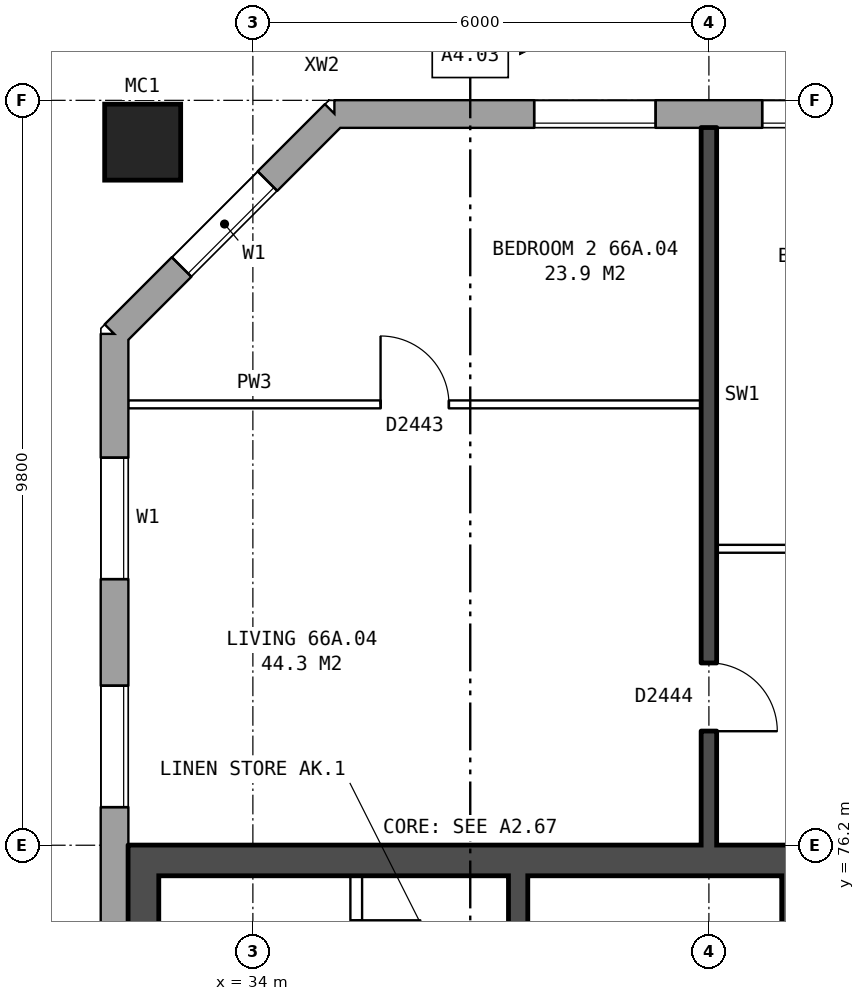
"""IFC4 building model, lengths in metres.
Left out: names, types, materials, properties, quantities, classifications, styles, units other than length and angle.
Written with IfcOpenShell. Run it as: python <this file> out.ifc"""

import sys

from ifc_helpers import new_model, si_unit, direction, frame, frame_2d, origin, origin_2d, place, context, subcontext, project, spatial, rectangle, hollow_rectangle, extrude, element, fill, save


model = new_model("IFC4")
c1 = context("Model", 3, precision=1e-05, world=origin(), true_north=direction((0.0, 1.0)))
c2 = subcontext(c1, "Body", "Model", "MODEL_VIEW")
j1 = project(units=[si_unit("LENGTHUNIT", "METRE"), si_unit("PLANEANGLEUNIT", "RADIAN")], contexts=[c1])
p1 = place(None, origin())
s1 = spatial("IfcSite", under=j1, at=p1, CompositionType="ELEMENT")
p2 = place(p1, origin())
s2 = spatial("IfcBuilding", under=s1, at=p2, CompositionType="ELEMENT")
p3 = place(p2, frame((0.0, 0.0, 233.8)))
s3 = spatial("IfcBuildingStorey", under=s2, at=p3, CompositionType="ELEMENT", Elevation=233.8)
p4 = place(p3, frame((32.55, 85.45, 0.0), z_axis=(0.0, 0.0, 1.0), x_axis=(1.0, 0.0, 0.0)))
e1 = element("IfcColumn", 1, at=p4, inside=s3, PredefinedType="COLUMN", context=c2, shape_type="SweptSolid", body=[
    extrude(hollow_rectangle(XDim=1.0, YDim=1.0, WallThickness=0.055, at=origin_2d()), origin(), (0.0, 0.0, 1.0), 3.1),
])
p5 = place(p3, frame((74.95, 85.82, 0.0), z_axis=(0.0, 0.0, 1.0), x_axis=(-1.0, 0.0, 0.0)))
e2 = element("IfcWall", 2, at=p5, inside=s3, PredefinedType="STANDARD", context=c2, shape_type="SweptSolid", body=[
    extrude(rectangle(XDim=39.875, YDim=0.36, at=frame_2d((19.938, 0.0))), origin(), (0.0, 0.0, 1.0), 2.85),
])
p6 = place(p5, frame((2.65, 0.0, 0.8)))
e3 = element("IfcOpeningElement", 3, at=p6, cuts=e2, PredefinedType="OPENING", context=c2, shape_type="SweptSolid", body=[
    extrude(rectangle(XDim=1.6, YDim=1.8, at=frame_2d((0.8, 0.9))), frame((0.0, 0.19, 0.0), z_axis=(0.0, -1.0, 0.0), x_axis=(1.0, 0.0, 0.0)), (0.0, 0.0, 1.0), 0.38),
])
p7 = place(p5, frame((5.65, 0.0, 0.8)))
e4 = element("IfcOpeningElement", 4, at=p7, cuts=e2, PredefinedType="OPENING", context=c2, shape_type="SweptSolid", body=[
    extrude(rectangle(XDim=1.6, YDim=1.8, at=frame_2d((0.8, 0.9))), frame((0.0, 0.19, 0.0), z_axis=(0.0, -1.0, 0.0), x_axis=(1.0, 0.0, 0.0)), (0.0, 0.0, 1.0), 0.38),
])
p8 = place(p5, frame((8.65, 0.0, 0.8)))
e5 = element("IfcOpeningElement", 5, at=p8, cuts=e2, PredefinedType="OPENING", context=c2, shape_type="SweptSolid", body=[
    extrude(rectangle(XDim=1.6, YDim=1.8, at=frame_2d((0.8, 0.9))), frame((0.0, 0.19, 0.0), z_axis=(0.0, -1.0, 0.0), x_axis=(1.0, 0.0, 0.0)), (0.0, 0.0, 1.0), 0.38),
])
p9 = place(p5, frame((11.65, 0.0, 0.8)))
e6 = element("IfcOpeningElement", 6, at=p9, cuts=e2, PredefinedType="OPENING", context=c2, shape_type="SweptSolid", body=[
    extrude(rectangle(XDim=1.6, YDim=1.8, at=frame_2d((0.8, 0.9))), frame((0.0, 0.19, 0.0), z_axis=(0.0, -1.0, 0.0), x_axis=(1.0, 0.0, 0.0)), (0.0, 0.0, 1.0), 0.38),
])
p10 = place(p5, frame((14.65, 0.0, 0.8)))
e7 = element("IfcOpeningElement", 7, at=p10, cuts=e2, PredefinedType="OPENING", context=c2, shape_type="SweptSolid", body=[
    extrude(rectangle(XDim=1.6, YDim=1.8, at=frame_2d((0.8, 0.9))), frame((0.0, 0.19, 0.0), z_axis=(0.0, -1.0, 0.0), x_axis=(1.0, 0.0, 0.0)), (0.0, 0.0, 1.0), 0.38),
])
p11 = place(p5, frame((17.65, 0.0, 0.8)))
e8 = element("IfcOpeningElement", 8, at=p11, cuts=e2, PredefinedType="OPENING", context=c2, shape_type="SweptSolid", body=[
    extrude(rectangle(XDim=1.6, YDim=1.8, at=frame_2d((0.8, 0.9))), frame((0.0, 0.19, 0.0), z_axis=(0.0, -1.0, 0.0), x_axis=(1.0, 0.0, 0.0)), (0.0, 0.0, 1.0), 0.38),
])
p12 = place(p5, frame((20.5, 0.0, 0.15)))
e9 = element("IfcOpeningElement", 9, at=p12, cuts=e2, PredefinedType="OPENING", context=c2, shape_type="SweptSolid", body=[
    extrude(rectangle(XDim=0.8, YDim=0.9, at=frame_2d((0.4, 0.45))), frame((0.0, 0.19, 0.0), z_axis=(0.0, -1.0, 0.0), x_axis=(1.0, 0.0, 0.0)), (0.0, 0.0, 1.0), 0.38),
])
p13 = place(p5, frame((23.65, 0.0, 0.8)))
e10 = element("IfcOpeningElement", 10, at=p13, cuts=e2, PredefinedType="OPENING", context=c2, shape_type="SweptSolid", body=[
    extrude(rectangle(XDim=1.6, YDim=1.8, at=frame_2d((0.8, 0.9))), frame((0.0, 0.19, 0.0), z_axis=(0.0, -1.0, 0.0), x_axis=(1.0, 0.0, 0.0)), (0.0, 0.0, 1.0), 0.38),
])
p14 = place(p5, frame((26.65, 0.0, 0.8)))
e11 = element("IfcOpeningElement", 11, at=p14, cuts=e2, PredefinedType="OPENING", context=c2, shape_type="SweptSolid", body=[
    extrude(rectangle(XDim=1.6, YDim=1.8, at=frame_2d((0.8, 0.9))), frame((0.0, 0.19, 0.0), z_axis=(0.0, -1.0, 0.0), x_axis=(1.0, 0.0, 0.0)), (0.0, 0.0, 1.0), 0.38),
])
p15 = place(p5, frame((29.65, 0.0, 0.8)))
e12 = element("IfcOpeningElement", 12, at=p15, cuts=e2, PredefinedType="OPENING", context=c2, shape_type="SweptSolid", body=[
    extrude(rectangle(XDim=1.6, YDim=1.8, at=frame_2d((0.8, 0.9))), frame((0.0, 0.19, 0.0), z_axis=(0.0, -1.0, 0.0), x_axis=(1.0, 0.0, 0.0)), (0.0, 0.0, 1.0), 0.38),
])
p16 = place(p5, frame((32.65, 0.0, 0.8)))
e13 = element("IfcOpeningElement", 13, at=p16, cuts=e2, PredefinedType="OPENING", context=c2, shape_type="SweptSolid", body=[
    extrude(rectangle(XDim=1.6, YDim=1.8, at=frame_2d((0.8, 0.9))), frame((0.0, 0.19, 0.0), z_axis=(0.0, -1.0, 0.0), x_axis=(1.0, 0.0, 0.0)), (0.0, 0.0, 1.0), 0.38),
])
p17 = place(p5, frame((35.65, 0.0, 0.8)))
e14 = element("IfcOpeningElement", 14, at=p17, cuts=e2, PredefinedType="OPENING", context=c2, shape_type="SweptSolid", body=[
    extrude(rectangle(XDim=1.6, YDim=1.8, at=frame_2d((0.8, 0.9))), frame((0.0, 0.19, 0.0), z_axis=(0.0, -1.0, 0.0), x_axis=(1.0, 0.0, 0.0)), (0.0, 0.0, 1.0), 0.38),
])
p18 = place(p3, frame((35.075, 85.82, 0.0), z_axis=(0.0, 0.0, 1.0), x_axis=(-0.707106781187, -0.707106781187, 0.0)))
e15 = element("IfcWall", 15, at=p18, inside=s3, PredefinedType="STANDARD", context=c2, shape_type="SweptSolid", body=[
    extrude(rectangle(XDim=4.094, YDim=0.36, at=frame_2d((2.047, 0.0))), origin(), (0.0, 0.0, 1.0), 2.85),
])
p19 = place(p18, frame((1.247, 0.0, 0.8)))
e16 = element("IfcOpeningElement", 16, at=p19, cuts=e15, PredefinedType="OPENING", context=c2, shape_type="SweptSolid", body=[
    extrude(rectangle(XDim=1.6, YDim=1.8, at=frame_2d((0.8, 0.9))), frame((0.0, 0.19, 0.0), z_axis=(0.0, -1.0, 0.0), x_axis=(1.0, 0.0, 0.0)), (0.0, 0.0, 1.0), 0.38),
])
p20 = place(p3, frame((32.18, 82.925, 0.0), z_axis=(0.0, 0.0, 1.0), x_axis=(0.0, -1.0, 0.0)))
e17 = element("IfcWall", 17, at=p20, inside=s3, PredefinedType="STANDARD", context=c2, shape_type="SweptSolid", body=[
    extrude(rectangle(XDim=25.851, YDim=0.36, at=frame_2d((12.925, 0.0))), origin(), (0.0, 0.0, 1.0), 2.85),
])
p21 = place(p20, frame((1.625, 0.0, 0.8)))
e18 = element("IfcOpeningElement", 18, at=p21, cuts=e17, PredefinedType="OPENING", context=c2, shape_type="SweptSolid", body=[
    extrude(rectangle(XDim=1.6, YDim=1.8, at=frame_2d((0.8, 0.9))), frame((0.0, 0.19, 0.0), z_axis=(0.0, -1.0, 0.0), x_axis=(1.0, 0.0, 0.0)), (0.0, 0.0, 1.0), 0.38),
])
p22 = place(p20, frame((4.625, 0.0, 0.8)))
e19 = element("IfcOpeningElement", 19, at=p22, cuts=e17, PredefinedType="OPENING", context=c2, shape_type="SweptSolid", body=[
    extrude(rectangle(XDim=1.6, YDim=1.8, at=frame_2d((0.8, 0.9))), frame((0.0, 0.19, 0.0), z_axis=(0.0, -1.0, 0.0), x_axis=(1.0, 0.0, 0.0)), (0.0, 0.0, 1.0), 0.38),
])
p23 = place(p20, frame((19.625, 0.0, 0.8)))
e20 = element("IfcOpeningElement", 20, at=p23, cuts=e17, PredefinedType="OPENING", context=c2, shape_type="SweptSolid", body=[
    extrude(rectangle(XDim=1.6, YDim=1.8, at=frame_2d((0.8, 0.9))), frame((0.0, 0.19, 0.0), z_axis=(0.0, -1.0, 0.0), x_axis=(1.0, 0.0, 0.0)), (0.0, 0.0, 1.0), 0.38),
])
p24 = place(p20, frame((22.625, 0.0, 0.8)))
e21 = element("IfcOpeningElement", 21, at=p24, cuts=e17, PredefinedType="OPENING", context=c2, shape_type="SweptSolid", body=[
    extrude(rectangle(XDim=1.6, YDim=1.8, at=frame_2d((0.8, 0.9))), frame((0.0, 0.19, 0.0), z_axis=(0.0, -1.0, 0.0), x_axis=(1.0, 0.0, 0.0)), (0.0, 0.0, 1.0), 0.38),
])
p25 = place(p3, frame((41.16, 76.2, 0.0), z_axis=(0.0, 0.0, 1.0), x_axis=(0.0, -1.0, 0.0)))
e22 = element("IfcWall", 22, at=p25, inside=s3, PredefinedType="SHEAR", context=c2, shape_type="SweptSolid", body=[
    extrude(rectangle(XDim=12.4, YDim=0.4, at=frame_2d((6.2, 0.0))), origin(), (0.0, 0.0, 1.0), 2.85),
])
p26 = place(p25, frame((1.325, 0.0, 0.0)))
e23 = element("IfcOpeningElement", 23, at=p26, cuts=e22, PredefinedType="OPENING", context=c2, shape_type="SweptSolid", body=[
    extrude(rectangle(XDim=1.1, YDim=2.1, at=frame_2d((0.55, 1.05))), frame((0.0, 0.21, 0.0), z_axis=(0.0, -1.0, 0.0), x_axis=(1.0, 0.0, 0.0)), (0.0, 0.0, 1.0), 0.42),
])
p27 = place(p25, frame((4.225, 0.0, 0.0)))
e24 = element("IfcOpeningElement", 24, at=p27, cuts=e22, PredefinedType="OPENING", context=c2, shape_type="SweptSolid", body=[
    extrude(rectangle(XDim=0.85, YDim=2.1, at=frame_2d((0.425, 1.05))), frame((0.0, 0.21, 0.0), z_axis=(0.0, -1.0, 0.0), x_axis=(1.0, 0.0, 0.0)), (0.0, 0.0, 1.0), 0.42),
])
p28 = place(p25, frame((7.475, 0.0, 0.0)))
e25 = element("IfcOpeningElement", 25, at=p28, cuts=e22, PredefinedType="OPENING", context=c2, shape_type="SweptSolid", body=[
    extrude(rectangle(XDim=0.85, YDim=2.1, at=frame_2d((0.425, 1.05))), frame((0.0, 0.21, 0.0), z_axis=(0.0, -1.0, 0.0), x_axis=(1.0, 0.0, 0.0)), (0.0, 0.0, 1.0), 0.42),
])
p29 = place(p25, frame((9.9, 0.0, 0.0)))
e26 = element("IfcOpeningElement", 26, at=p29, cuts=e22, PredefinedType="OPENING", context=c2, shape_type="SweptSolid", body=[
    extrude(rectangle(XDim=1.1, YDim=2.1, at=frame_2d((0.55, 1.05))), frame((0.0, 0.21, 0.0), z_axis=(0.0, -1.0, 0.0), x_axis=(1.0, 0.0, 0.0)), (0.0, 0.0, 1.0), 0.42),
])
p30 = place(p3, frame((32.56, 76.2, 0.0), z_axis=(0.0, 0.0, 1.0), x_axis=(0.0, -1.0, 0.0)))
e27 = element("IfcWall", 27, at=p30, inside=s3, PredefinedType="SHEAR", context=c2, shape_type="SweptSolid", body=[
    extrude(rectangle(XDim=12.4, YDim=0.4, at=frame_2d((6.2, 0.0))), origin(), (0.0, 0.0, 1.0), 2.85),
])
p31 = place(p3, frame((40.96, 76.0, 0.0), z_axis=(0.0, 0.0, 1.0), x_axis=(-1.0, 0.0, 0.0)))
e28 = element("IfcWall", 28, at=p31, inside=s3, PredefinedType="SHEAR", context=c2, shape_type="SweptSolid", body=[
    extrude(rectangle(XDim=8.2, YDim=0.4, at=frame_2d((4.1, 0.0))), origin(), (0.0, 0.0, 1.0), 2.85),
])
p32 = place(p3, frame((37.49, 75.8, 0.0), z_axis=(0.0, 0.0, 1.0), x_axis=(0.0, -1.0, 0.0)))
e29 = element("IfcWall", 29, at=p32, inside=s3, PredefinedType="SHEAR", context=c2, shape_type="SweptSolid", body=[
    extrude(rectangle(XDim=2.525, YDim=0.25, at=frame_2d((1.263, 0.0))), origin(), (0.0, 0.0, 1.0), 2.85),
])
p33 = place(p3, frame((35.36, 75.8, 0.0), z_axis=(0.0, 0.0, 1.0), x_axis=(0.0, -1.0, 0.0)))
e30 = element("IfcWall", 30, at=p33, inside=s3, PredefinedType="PARTITIONING", context=c2, shape_type="SweptSolid", body=[
    extrude(rectangle(XDim=2.025, YDim=0.15, at=frame_2d((1.013, 0.0))), origin(), (0.0, 0.0, 1.0), 2.85),
])
p34 = place(p33, frame((0.587, 0.0, 0.0)))
e31 = element("IfcOpeningElement", 31, at=p34, cuts=e30, PredefinedType="OPENING", context=c2, shape_type="SweptSolid", body=[
    extrude(rectangle(XDim=0.85, YDim=2.1, at=frame_2d((0.425, 1.05))), frame((0.0, 0.085, 0.0), z_axis=(0.0, -1.0, 0.0), x_axis=(1.0, 0.0, 0.0)), (0.0, 0.0, 1.0), 0.17),
])
p35 = place(p3, frame((40.1, 80.1, 0.0), z_axis=(0.0, 0.0, 1.0), x_axis=(1.0, 0.0, 0.0)))
e32 = element("IfcWall", 32, at=p35, inside=s3, PredefinedType="PARTITIONING", context=c2, shape_type="SweptSolid", body=[
    extrude(rectangle(XDim=5.8, YDim=0.1, at=frame_2d((2.9, 0.0))), origin(), (0.0, 0.0, 1.0), 2.85),
])
p36 = place(p35, frame((1.3, 0.0, 0.0)))
e33 = element("IfcOpeningElement", 33, at=p36, cuts=e32, PredefinedType="OPENING", context=c2, shape_type="SweptSolid", body=[
    extrude(rectangle(XDim=0.9, YDim=2.1, at=frame_2d((0.45, 1.05))), frame((0.0, 0.06, 0.0), z_axis=(0.0, -1.0, 0.0), x_axis=(1.0, 0.0, 0.0)), (0.0, 0.0, 1.0), 0.12),
])
p37 = place(p35, frame((4.2, 0.0, 0.0)))
e34 = element("IfcOpeningElement", 34, at=p37, cuts=e32, PredefinedType="OPENING", context=c2, shape_type="SweptSolid", body=[
    extrude(rectangle(XDim=0.9, YDim=2.1, at=frame_2d((0.45, 1.05))), frame((0.0, 0.06, 0.0), z_axis=(0.0, -1.0, 0.0), x_axis=(1.0, 0.0, 0.0)), (0.0, 0.0, 1.0), 0.12),
])
p38 = place(p3, frame((32.36, 82.0, 0.0), z_axis=(0.0, 0.0, 1.0), x_axis=(1.0, 0.0, 0.0)))
e35 = element("IfcWall", 35, at=p38, inside=s3, PredefinedType="PARTITIONING", context=c2, shape_type="SweptSolid", body=[
    extrude(rectangle(XDim=7.54, YDim=0.1, at=frame_2d((3.77, 0.0))), origin(), (0.0, 0.0, 1.0), 2.85),
])
p39 = place(p38, frame((3.32, 0.0, 0.0)))
e36 = element("IfcOpeningElement", 36, at=p39, cuts=e35, PredefinedType="OPENING", context=c2, shape_type="SweptSolid", body=[
    extrude(rectangle(XDim=0.9, YDim=2.1, at=frame_2d((0.45, 1.05))), frame((0.0, 0.06, 0.0), z_axis=(0.0, -1.0, 0.0), x_axis=(1.0, 0.0, 0.0)), (0.0, 0.0, 1.0), 0.12),
])
p40 = place(p3, frame((40.0, 76.2, 0.0), z_axis=(0.0, 0.0, 1.0), x_axis=(0.0, 1.0, 0.0)))
e37 = element("IfcWall", 37, at=p40, inside=s3, PredefinedType="SOLIDWALL", context=c2, shape_type="SweptSolid", body=[
    extrude(rectangle(XDim=9.44, YDim=0.2, at=frame_2d((4.72, 0.0))), origin(), (0.0, 0.0, 1.0), 2.85),
])
p41 = place(p40, frame((1.5, 0.0, 0.0)))
e38 = element("IfcOpeningElement", 38, at=p41, cuts=e37, PredefinedType="OPENING", context=c2, shape_type="SweptSolid", body=[
    extrude(rectangle(XDim=0.9, YDim=2.1, at=frame_2d((0.45, 1.05))), frame((0.0, 0.11, 0.0), z_axis=(0.0, -1.0, 0.0), x_axis=(1.0, 0.0, 0.0)), (0.0, 0.0, 1.0), 0.22),
])
p42 = place(p16, origin())
e39 = element("IfcWindow", 39, at=p42, inside=s3, PartitioningType="SINGLE_PANEL", PredefinedType="WINDOW", context=c2, shape_type="SweptSolid", body=[
    extrude(rectangle(XDim=1.6, YDim=1.8, at=frame_2d((0.8, 0.9))), frame((0.0, 0.15, 0.0), z_axis=(0.0, -1.0, 0.0), x_axis=(1.0, 0.0, 0.0)), (0.0, 0.0, 1.0), 0.06),
])
fill(e13, e39)
p43 = place(p17, origin())
e40 = element("IfcWindow", 40, at=p43, inside=s3, PartitioningType="SINGLE_PANEL", PredefinedType="WINDOW", context=c2, shape_type="SweptSolid", body=[
    extrude(rectangle(XDim=1.6, YDim=1.8, at=frame_2d((0.8, 0.9))), frame((0.0, 0.15, 0.0), z_axis=(0.0, -1.0, 0.0), x_axis=(1.0, 0.0, 0.0)), (0.0, 0.0, 1.0), 0.06),
])
fill(e14, e40)
p44 = place(p19, origin())
e41 = element("IfcWindow", 41, at=p44, inside=s3, PartitioningType="SINGLE_PANEL", PredefinedType="WINDOW", context=c2, shape_type="SweptSolid", body=[
    extrude(rectangle(XDim=1.6, YDim=1.8, at=frame_2d((0.8, 0.9))), frame((0.0, 0.15, 0.0), z_axis=(0.0, -1.0, 0.0), x_axis=(1.0, 0.0, 0.0)), (0.0, 0.0, 1.0), 0.06),
])
fill(e16, e41)
p45 = place(p21, origin())
e42 = element("IfcWindow", 42, at=p45, inside=s3, PartitioningType="SINGLE_PANEL", PredefinedType="WINDOW", context=c2, shape_type="SweptSolid", body=[
    extrude(rectangle(XDim=1.6, YDim=1.8, at=frame_2d((0.8, 0.9))), frame((0.0, 0.15, 0.0), z_axis=(0.0, -1.0, 0.0), x_axis=(1.0, 0.0, 0.0)), (0.0, 0.0, 1.0), 0.06),
])
fill(e18, e42)
p46 = place(p22, origin())
e43 = element("IfcWindow", 43, at=p46, inside=s3, PartitioningType="SINGLE_PANEL", PredefinedType="WINDOW", context=c2, shape_type="SweptSolid", body=[
    extrude(rectangle(XDim=1.6, YDim=1.8, at=frame_2d((0.8, 0.9))), frame((0.0, 0.15, 0.0), z_axis=(0.0, -1.0, 0.0), x_axis=(1.0, 0.0, 0.0)), (0.0, 0.0, 1.0), 0.06),
])
fill(e19, e43)
p47 = place(p34, origin())
e44 = element("IfcDoor", 44, at=p47, inside=s3, OperationType="SINGLE_SWING_LEFT", PredefinedType="DOOR", context=c2, shape_type="SweptSolid", body=[
    extrude(rectangle(XDim=0.85, YDim=2.1, at=frame_2d((0.425, 1.05))), frame((0.0, 0.025, 0.0), z_axis=(0.0, -1.0, 0.0), x_axis=(1.0, 0.0, 0.0)), (0.0, 0.0, 1.0), 0.05),
])
fill(e31, e44)
p48 = place(p39, origin())
e45 = element("IfcDoor", 45, at=p48, inside=s3, OperationType="SINGLE_SWING_LEFT", PredefinedType="DOOR", context=c2, shape_type="SweptSolid", body=[
    extrude(rectangle(XDim=0.9, YDim=2.1, at=frame_2d((0.45, 1.05))), frame((0.0, 0.025, 0.0), z_axis=(0.0, -1.0, 0.0), x_axis=(1.0, 0.0, 0.0)), (0.0, 0.0, 1.0), 0.05),
])
fill(e36, e45)
p49 = place(p41, frame((0.9, 0.0, 0.0), z_axis=(0.0, 0.0, 1.0), x_axis=(-1.0, 0.0, 0.0)))
e46 = element("IfcDoor", 46, at=p49, inside=s3, OperationType="SINGLE_SWING_RIGHT", PredefinedType="DOOR", context=c2, shape_type="SweptSolid", body=[
    extrude(rectangle(XDim=0.9, YDim=2.1, at=frame_2d((0.45, 1.05))), frame((0.0, 0.025, 0.0), z_axis=(0.0, -1.0, 0.0), x_axis=(1.0, 0.0, 0.0)), (0.0, 0.0, 1.0), 0.05),
])
fill(e38, e46)
save(model, sys.argv[1])
